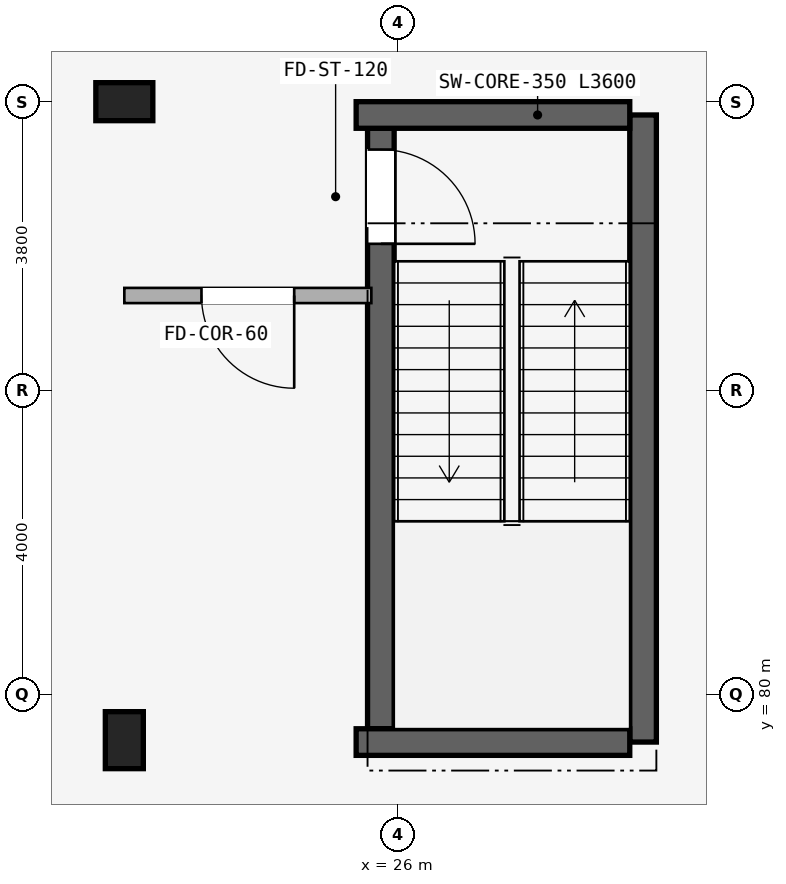
"""IFC4 building model, lengths in metres.
Left out: names, types, materials, properties, quantities, classifications, styles, units other than length and angle.
Written with IfcOpenShell. Run it as: python <this file> out.ifc"""

import sys

from ifc_helpers import new_model, si_unit, direction, frame, frame_2d, origin, origin_2d, place, context, subcontext, project, spatial, rectangle, extrude, element, fill, save


model = new_model("IFC4")
c1 = context("Model", 3, precision=1e-05, world=origin(), true_north=direction((0.0, 1.0)))
c2 = subcontext(c1, "Body", "Model", "MODEL_VIEW")
j1 = project(units=[si_unit("LENGTHUNIT", "METRE"), si_unit("PLANEANGLEUNIT", "RADIAN")], contexts=[c1])
p1 = place(None, origin())
s1 = spatial("IfcSite", under=j1, at=p1, CompositionType="ELEMENT")
p2 = place(p1, origin())
s2 = spatial("IfcBuilding", under=s1, at=p2, CompositionType="ELEMENT")
p3 = place(p2, frame((0.0, 0.0, -4.5)))
s3 = spatial("IfcBuildingStorey", under=s2, at=p3, CompositionType="ELEMENT", Elevation=-4.5)
p4 = place(p3, frame((29.225, 87.625, -0.5), z_axis=(0.0, 0.0, 1.0), x_axis=(0.0, -1.0, 0.0)))
e1 = element("IfcWall", 1, at=p4, inside=s3, PredefinedType="SHEAR", context=c2, shape_type="SweptSolid", body=[
    extrude(rectangle(XDim=8.25, YDim=0.35, at=frame_2d((4.125, 0.0))), origin(), (0.0, 0.0, 1.0), 4.78),
])
p5 = place(p3, frame((25.775, 87.45, 0.0), z_axis=(0.0, 0.0, 1.0), x_axis=(0.0, -1.0, 0.0)))
e2 = element("IfcWall", 2, at=p5, inside=s3, PredefinedType="SHEAR", context=c2, shape_type="SweptSolid", body=[
    extrude(rectangle(XDim=7.9, YDim=0.35, at=frame_2d((3.95, 0.0))), origin(), (0.0, 0.0, 1.0), 4.28),
])
p6 = place(p5, frame((0.28, 0.0, 0.0)))
e3 = element("IfcOpeningElement", 3, at=p6, cuts=e2, PredefinedType="OPENING", context=c2, shape_type="SweptSolid", body=[
    extrude(rectangle(XDim=1.24, YDim=2.15, at=frame_2d((0.62, 1.075))), frame((0.0, 0.185, 0.0), z_axis=(0.0, -1.0, 0.0), x_axis=(1.0, 0.0, 0.0)), (0.0, 0.0, 1.0), 0.37),
])
for number, where, z_axis, x_axis in (
    (4, (29.05, 87.625, -0.5), (0.0, 0.0, 1.0), (-1.0, 0.0, 0.0)),
    (5, (29.05, 79.375, -0.5), (0.0, 0.0, 1.0), (-1.0, 0.0, 0.0)),
):
    element("IfcWall", number, at=place(p3, frame(where, z_axis=z_axis, x_axis=x_axis)), inside=s3, PredefinedType="SHEAR", context=c2, shape_type="SweptSolid", body=[
        extrude(rectangle(XDim=3.6, YDim=0.35, at=frame_2d((1.8, 0.0))), origin(), (0.0, 0.0, 1.0), 4.78),
    ])
for number, where, z_axis, x_axis in (
    (6, (22.4, 87.8, -0.5), (0.0, 0.0, 1.0), (0.0, 1.0, 0.0)),
    (7, (22.4, 79.4, -0.5), (0.0, 0.0, 1.0), (1.0, 0.0, 0.0)),
):
    element("IfcColumn", number, at=place(p3, frame(where, z_axis=z_axis, x_axis=x_axis)), inside=s3, PredefinedType="COLUMN", context=c2, shape_type="SweptSolid", body=[
        extrude(rectangle(XDim=0.5, YDim=0.75, at=origin_2d()), origin(), (0.0, 0.0, 1.0), 4.78),
    ])
p7 = place(p3, frame((25.65, 85.25, 0.0), z_axis=(0.0, 0.0, 1.0), x_axis=(-1.0, 0.0, 0.0)))
e8 = element("IfcWall", 8, at=p7, inside=s3, PredefinedType="STANDARD", context=c2, shape_type="SweptSolid", body=[
    extrude(rectangle(XDim=3.25, YDim=0.2, at=frame_2d((1.625, 0.0))), origin(), (0.0, 0.0, 1.0), 3.622),
])
p8 = place(p7, frame((1.015, 0.0, 0.0)))
e9 = element("IfcOpeningElement", 9, at=p8, cuts=e8, PredefinedType="OPENING", context=c2, shape_type="SweptSolid", body=[
    extrude(rectangle(XDim=1.22, YDim=2.15, at=frame_2d((0.61, 1.075))), frame((0.0, 0.11, 0.0), z_axis=(0.0, -1.0, 0.0), x_axis=(1.0, 0.0, 0.0)), (0.0, 0.0, 1.0), 0.22),
])
p9 = place(p6, origin())
e10 = element("IfcDoor", 10, at=p9, inside=s3, OperationType="SINGLE_SWING_RIGHT", PredefinedType="DOOR", context=c2, shape_type="SweptSolid", body=[
    extrude(rectangle(XDim=1.24, YDim=2.15, at=frame_2d((0.62, 1.075))), frame((0.0, 0.025, 0.0), z_axis=(0.0, -1.0, 0.0), x_axis=(1.0, 0.0, 0.0)), (0.0, 0.0, 1.0), 0.05),
])
fill(e3, e10)
p10 = place(p8, frame((1.22, 0.0, 0.0), z_axis=(0.0, 0.0, 1.0), x_axis=(-1.0, 0.0, 0.0)))
e11 = element("IfcDoor", 11, at=p10, inside=s3, OperationType="SINGLE_SWING_RIGHT", PredefinedType="DOOR", context=c2, shape_type="SweptSolid", body=[
    extrude(rectangle(XDim=1.22, YDim=2.15, at=frame_2d((0.61, 1.075))), frame((0.0, 0.025, 0.0), z_axis=(0.0, -1.0, 0.0), x_axis=(1.0, 0.0, 0.0)), (0.0, 0.0, 1.0), 0.05),
])
fill(e9, e11)
save(model, sys.argv[1])
